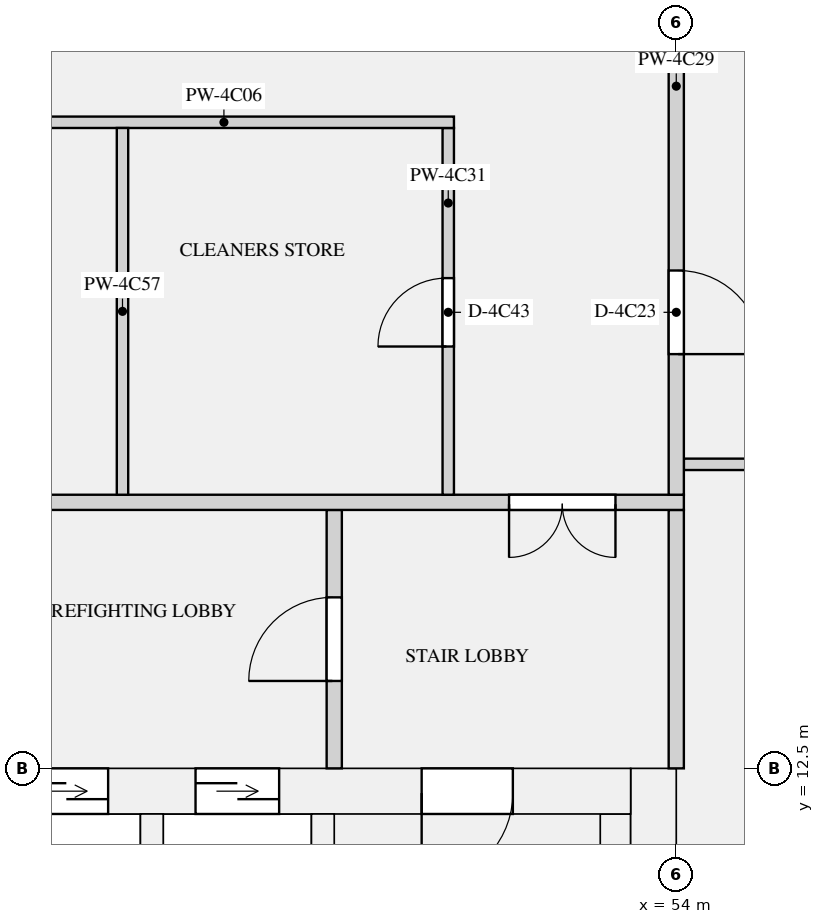
"""IFC4 building model, lengths in metres.
Left out: names, types, materials, properties, quantities, classifications, styles, units other than length and angle.
Written with IfcOpenShell. Run it as: python <this file> out.ifc"""

import sys

from ifc_helpers import new_model, si_unit, direction, frame, frame_2d, origin, place, context, subcontext, project, spatial, rectangle, extrude, element, fill, save


model = new_model("IFC4")
c1 = context("Model", 3, precision=1e-05, world=origin(), true_north=direction((0.0, 1.0)))
c2 = subcontext(c1, "Body", "Model", "MODEL_VIEW")
j1 = project(units=[si_unit("LENGTHUNIT", "METRE"), si_unit("PLANEANGLEUNIT", "RADIAN")], contexts=[c1])
p1 = place(None, origin())
s1 = spatial("IfcSite", under=j1, at=p1, CompositionType="ELEMENT")
p2 = place(p1, origin())
s2 = spatial("IfcBuilding", under=s1, at=p2, CompositionType="ELEMENT")
p3 = place(p2, frame((0.0, 0.0, 216.9)))
s3 = spatial("IfcBuildingStorey", under=s2, at=p3, CompositionType="ELEMENT", Elevation=216.9)
p4 = place(p3, frame((53.7, 0.0, 0.0), z_axis=(0.0, 0.0, 1.0), x_axis=(0.0, 1.0, 0.0)))
e1 = element("IfcWall", 1, at=p4, inside=s3, PredefinedType="SHEAR", context=c2, shape_type="SweptSolid", body=[
    extrude(rectangle(XDim=12.5, YDim=0.6, at=frame_2d((6.25, 0.0))), origin(), (0.0, 0.0, 1.0), 3.15),
])
p5 = place(p3, frame((18.6, 12.2, 0.0), z_axis=(0.0, 0.0, 1.0), x_axis=(1.0, 0.0, 0.0)))
e2 = element("IfcWall", 2, at=p5, inside=s3, PredefinedType="SHEAR", context=c2, shape_type="SweptSolid", body=[
    extrude(rectangle(XDim=34.8, YDim=0.6, at=frame_2d((17.4, 0.0))), origin(), (0.0, 0.0, 1.0), 3.15),
])
p6 = place(p5, frame((24.575, 0.0, 0.0)))
e3 = element("IfcOpeningElement", 3, at=p6, cuts=e2, PredefinedType="OPENING", context=c2, shape_type="SweptSolid", body=[
    extrude(rectangle(XDim=1.1, YDim=2.1, at=frame_2d((0.55, 1.05))), frame((0.0, 0.31, 0.0), z_axis=(0.0, -1.0, 0.0), x_axis=(1.0, 0.0, 0.0)), (0.0, 0.0, 1.0), 0.62),
])
p7 = place(p5, frame((26.825, 0.0, 0.0)))
e4 = element("IfcOpeningElement", 4, at=p7, cuts=e2, PredefinedType="OPENING", context=c2, shape_type="SweptSolid", body=[
    extrude(rectangle(XDim=1.1, YDim=2.1, at=frame_2d((0.55, 1.05))), frame((0.0, 0.31, 0.0), z_axis=(0.0, -1.0, 0.0), x_axis=(1.0, 0.0, 0.0)), (0.0, 0.0, 1.0), 0.62),
])
p8 = place(p5, frame((29.075, 0.0, 0.0)))
e5 = element("IfcOpeningElement", 5, at=p8, cuts=e2, PredefinedType="OPENING", context=c2, shape_type="SweptSolid", body=[
    extrude(rectangle(XDim=1.1, YDim=2.1, at=frame_2d((0.55, 1.05))), frame((0.0, 0.31, 0.0), z_axis=(0.0, -1.0, 0.0), x_axis=(1.0, 0.0, 0.0)), (0.0, 0.0, 1.0), 0.62),
])
p9 = place(p5, frame((8.95, 0.0, 0.0)))
e6 = element("IfcOpeningElement", 6, at=p9, cuts=e2, PredefinedType="OPENING", context=c2, shape_type="SweptSolid", body=[
    extrude(rectangle(XDim=0.9, YDim=2.1, at=frame_2d((0.45, 1.05))), frame((0.0, 0.31, 0.0), z_axis=(0.0, -1.0, 0.0), x_axis=(1.0, 0.0, 0.0)), (0.0, 0.0, 1.0), 0.62),
])
p10 = place(p5, frame((1.55, 0.0, 0.0)))
e7 = element("IfcOpeningElement", 7, at=p10, cuts=e2, PredefinedType="OPENING", context=c2, shape_type="SweptSolid", body=[
    extrude(rectangle(XDim=1.2, YDim=2.1, at=frame_2d((0.6, 1.05))), frame((0.0, 0.31, 0.0), z_axis=(0.0, -1.0, 0.0), x_axis=(1.0, 0.0, 0.0)), (0.0, 0.0, 1.0), 0.62),
])
p11 = place(p5, frame((32.05, 0.0, 0.0)))
e8 = element("IfcOpeningElement", 8, at=p11, cuts=e2, PredefinedType="OPENING", context=c2, shape_type="SweptSolid", body=[
    extrude(rectangle(XDim=1.2, YDim=2.1, at=frame_2d((0.6, 1.05))), frame((0.0, 0.31, 0.0), z_axis=(0.0, -1.0, 0.0), x_axis=(1.0, 0.0, 0.0)), (0.0, 0.0, 1.0), 0.62),
])
p12 = place(p3, frame((53.2, 1.0, 0.0), z_axis=(0.0, 0.0, 1.0), x_axis=(0.0, 1.0, 0.0)))
e9 = element("IfcWall", 9, at=p12, inside=s3, PredefinedType="SHEAR", context=c2, shape_type="SweptSolid", body=[
    extrude(rectangle(XDim=10.9, YDim=0.4, at=frame_2d((5.45, 0.0))), origin(), (0.0, 0.0, 1.0), 3.15),
])
for number, where, z_axis, x_axis in (
    (10, (47.1, 8.25, 0.0), (0.0, 0.0, 1.0), (0.0, 1.0, 0.0)),
    (11, (49.35, 8.25, 0.0), (0.0, 0.0, 1.0), (0.0, 1.0, 0.0)),
):
    element("IfcWall", number, at=place(p3, frame(where, z_axis=z_axis, x_axis=x_axis)), inside=s3, PredefinedType="SHEAR", context=c2, shape_type="SweptSolid", body=[
        extrude(rectangle(XDim=3.65, YDim=0.3, at=frame_2d((1.825, 0.0))), origin(), (0.0, 0.0, 1.0), 3.15),
    ])
p13 = place(p3, frame((49.5, 12.5, 0.0), z_axis=(0.0, 0.0, 1.0), x_axis=(0.0, 1.0, 0.0)))
e12 = element("IfcWall", 12, at=p13, inside=s3, PredefinedType="PARTITIONING", context=c2, shape_type="SweptSolid", body=[
    extrude(rectangle(XDim=3.4, YDim=0.2, at=frame_2d((1.7, 0.0))), origin(), (0.0, 0.0, 1.0), 2.83),
])
p14 = place(p13, frame((1.15, 0.0, 0.0)))
e13 = element("IfcOpeningElement", 13, at=p14, cuts=e12, PredefinedType="OPENING", context=c2, shape_type="SweptSolid", body=[
    extrude(rectangle(XDim=1.1, YDim=2.1, at=frame_2d((0.55, 1.05))), frame((0.0, 0.11, 0.0), z_axis=(0.0, -1.0, 0.0), x_axis=(1.0, 0.0, 0.0)), (0.0, 0.0, 1.0), 0.22),
])
p15 = place(p3, frame((54.0, 12.5, 0.0), z_axis=(0.0, 0.0, 1.0), x_axis=(0.0, 1.0, 0.0)))
e14 = element("IfcWall", 14, at=p15, inside=s3, PredefinedType="PARTITIONING", context=c2, shape_type="SweptSolid", body=[
    extrude(rectangle(XDim=3.4, YDim=0.2, at=frame_2d((1.7, 0.0))), origin(), (0.0, 0.0, 1.0), 2.83),
])
p16 = place(p3, frame((20.925, 21.0, 0.0), z_axis=(0.0, 0.0, 1.0), x_axis=(1.0, 0.0, 0.0)))
e15 = element("IfcWall", 15, at=p16, inside=s3, PredefinedType="PARTITIONING", context=c2, shape_type="SweptSolid", body=[
    extrude(rectangle(XDim=30.15, YDim=0.15, at=frame_2d((15.075, 0.0))), origin(), (0.0, 0.0, 1.0), 2.83),
])
p17 = place(p16, frame((6.053, 0.0, 0.0)))
e16 = element("IfcOpeningElement", 16, at=p17, cuts=e15, PredefinedType="OPENING", context=c2, shape_type="SweptSolid", body=[
    extrude(rectangle(XDim=0.9, YDim=2.1, at=frame_2d((0.45, 1.05))), frame((0.0, 0.085, 0.0), z_axis=(0.0, -1.0, 0.0), x_axis=(1.0, 0.0, 0.0)), (0.0, 0.0, 1.0), 0.17),
])
p18 = place(p16, frame((10.339, 0.0, 0.0)))
e17 = element("IfcOpeningElement", 17, at=p18, cuts=e15, PredefinedType="OPENING", context=c2, shape_type="SweptSolid", body=[
    extrude(rectangle(XDim=0.9, YDim=2.1, at=frame_2d((0.45, 1.05))), frame((0.0, 0.085, 0.0), z_axis=(0.0, -1.0, 0.0), x_axis=(1.0, 0.0, 0.0)), (0.0, 0.0, 1.0), 0.17),
])
p19 = place(p16, frame((14.625, 0.0, 0.0)))
e18 = element("IfcOpeningElement", 18, at=p19, cuts=e15, PredefinedType="OPENING", context=c2, shape_type="SweptSolid", body=[
    extrude(rectangle(XDim=0.9, YDim=2.1, at=frame_2d((0.45, 1.05))), frame((0.0, 0.085, 0.0), z_axis=(0.0, -1.0, 0.0), x_axis=(1.0, 0.0, 0.0)), (0.0, 0.0, 1.0), 0.17),
])
p20 = place(p16, frame((18.911, 0.0, 0.0)))
e19 = element("IfcOpeningElement", 19, at=p20, cuts=e15, PredefinedType="OPENING", context=c2, shape_type="SweptSolid", body=[
    extrude(rectangle(XDim=0.9, YDim=2.1, at=frame_2d((0.45, 1.05))), frame((0.0, 0.085, 0.0), z_axis=(0.0, -1.0, 0.0), x_axis=(1.0, 0.0, 0.0)), (0.0, 0.0, 1.0), 0.17),
])
p21 = place(p16, frame((23.197, 0.0, 0.0)))
e20 = element("IfcOpeningElement", 20, at=p21, cuts=e15, PredefinedType="OPENING", context=c2, shape_type="SweptSolid", body=[
    extrude(rectangle(XDim=0.9, YDim=2.1, at=frame_2d((0.45, 1.05))), frame((0.0, 0.085, 0.0), z_axis=(0.0, -1.0, 0.0), x_axis=(1.0, 0.0, 0.0)), (0.0, 0.0, 1.0), 0.17),
])
p22 = place(p3, frame((54.1, 16.5, 0.0), z_axis=(0.0, 0.0, 1.0), x_axis=(1.0, 0.0, 0.0)))
e21 = element("IfcWall", 21, at=p22, inside=s3, PredefinedType="PARTITIONING", context=c2, shape_type="SweptSolid", body=[
    extrude(rectangle(XDim=14.75, YDim=0.15, at=frame_2d((7.375, 0.0))), origin(), (0.0, 0.0, 1.0), 2.83),
])
p23 = place(p22, frame((1.4, 0.0, 0.0)))
e22 = element("IfcOpeningElement", 22, at=p23, cuts=e21, PredefinedType="OPENING", context=c2, shape_type="SweptSolid", body=[
    extrude(rectangle(XDim=1.5, YDim=2.1, at=frame_2d((0.75, 1.05))), frame((0.0, 0.085, 0.0), z_axis=(0.0, -1.0, 0.0), x_axis=(1.0, 0.0, 0.0)), (0.0, 0.0, 1.0), 0.17),
])
p24 = place(p3, frame((17.925, 16.0, 0.0), z_axis=(0.0, 0.0, 1.0), x_axis=(1.0, 0.0, 0.0)))
e23 = element("IfcWall", 23, at=p24, inside=s3, PredefinedType="PARTITIONING", context=c2, shape_type="SweptSolid", body=[
    extrude(rectangle(XDim=36.175, YDim=0.2, at=frame_2d((18.087, 0.0))), origin(), (0.0, 0.0, 1.0), 2.83),
])
p25 = place(p24, frame((0.875, 0.0, 0.0)))
e24 = element("IfcOpeningElement", 24, at=p25, cuts=e23, PredefinedType="OPENING", context=c2, shape_type="SweptSolid", body=[
    extrude(rectangle(XDim=1.4, YDim=2.1, at=frame_2d((0.7, 1.05))), frame((0.0, 0.11, 0.0), z_axis=(0.0, -1.0, 0.0), x_axis=(1.0, 0.0, 0.0)), (0.0, 0.0, 1.0), 0.22),
])
p26 = place(p24, frame((33.875, 0.0, 0.0)))
e25 = element("IfcOpeningElement", 25, at=p26, cuts=e23, PredefinedType="OPENING", context=c2, shape_type="SweptSolid", body=[
    extrude(rectangle(XDim=1.4, YDim=2.1, at=frame_2d((0.7, 1.05))), frame((0.0, 0.11, 0.0), z_axis=(0.0, -1.0, 0.0), x_axis=(1.0, 0.0, 0.0)), (0.0, 0.0, 1.0), 0.22),
])
p27 = place(p3, frame((54.0, 16.1, 0.0), z_axis=(0.0, 0.0, 1.0), x_axis=(0.0, 1.0, 0.0)))
e26 = element("IfcWall", 26, at=p27, inside=s3, PredefinedType="PARTITIONING", context=c2, shape_type="SweptSolid", body=[
    extrude(rectangle(XDim=7.8, YDim=0.2, at=frame_2d((3.9, 0.0))), origin(), (0.0, 0.0, 1.0), 2.83),
])
p28 = place(p27, frame((1.85, 0.0, 0.0)))
e27 = element("IfcOpeningElement", 27, at=p28, cuts=e26, PredefinedType="OPENING", context=c2, shape_type="SweptSolid", body=[
    extrude(rectangle(XDim=1.1, YDim=2.1, at=frame_2d((0.55, 1.05))), frame((0.0, 0.11, 0.0), z_axis=(0.0, -1.0, 0.0), x_axis=(1.0, 0.0, 0.0)), (0.0, 0.0, 1.0), 0.22),
])
p29 = place(p3, frame((51.0, 16.1, 0.0), z_axis=(0.0, 0.0, 1.0), x_axis=(0.0, 1.0, 0.0)))
e28 = element("IfcWall", 28, at=p29, inside=s3, PredefinedType="PARTITIONING", context=c2, shape_type="SweptSolid", body=[
    extrude(rectangle(XDim=4.825, YDim=0.15, at=frame_2d((2.413, 0.0))), origin(), (0.0, 0.0, 1.0), 2.83),
])
p30 = place(p29, frame((1.95, 0.0, 0.0)))
e29 = element("IfcOpeningElement", 29, at=p30, cuts=e28, PredefinedType="OPENING", context=c2, shape_type="SweptSolid", body=[
    extrude(rectangle(XDim=0.9, YDim=2.1, at=frame_2d((0.45, 1.05))), frame((0.0, 0.085, 0.0), z_axis=(0.0, -1.0, 0.0), x_axis=(1.0, 0.0, 0.0)), (0.0, 0.0, 1.0), 0.17),
])
p31 = place(p3, frame((46.714, 16.1, 0.0), z_axis=(0.0, 0.0, 1.0), x_axis=(0.0, 1.0, 0.0)))
e30 = element("IfcWall", 30, at=p31, inside=s3, PredefinedType="PARTITIONING", context=c2, shape_type="SweptSolid", body=[
    extrude(rectangle(XDim=4.825, YDim=0.15, at=frame_2d((2.413, 0.0))), origin(), (0.0, 0.0, 1.0), 2.83),
])
p32 = place(p7, origin())
e31 = element("IfcDoor", 31, at=p32, inside=s3, OperationType="DOUBLE_DOOR_SLIDING", PredefinedType="DOOR", context=c2, shape_type="SweptSolid", body=[
    extrude(rectangle(XDim=1.1, YDim=2.1, at=frame_2d((0.55, 1.05))), frame((0.0, 0.025, 0.0), z_axis=(0.0, -1.0, 0.0), x_axis=(1.0, 0.0, 0.0)), (0.0, 0.0, 1.0), 0.05),
])
fill(e4, e31)
p33 = place(p8, origin())
e32 = element("IfcDoor", 32, at=p33, inside=s3, OperationType="DOUBLE_DOOR_SLIDING", PredefinedType="DOOR", context=c2, shape_type="SweptSolid", body=[
    extrude(rectangle(XDim=1.1, YDim=2.1, at=frame_2d((0.55, 1.05))), frame((0.0, 0.025, 0.0), z_axis=(0.0, -1.0, 0.0), x_axis=(1.0, 0.0, 0.0)), (0.0, 0.0, 1.0), 0.05),
])
fill(e5, e32)
p34 = place(p11, frame((1.2, 0.0, 0.0), z_axis=(0.0, 0.0, 1.0), x_axis=(-1.0, 0.0, 0.0)))
e33 = element("IfcDoor", 33, at=p34, inside=s3, OperationType="SINGLE_SWING_RIGHT", PredefinedType="DOOR", context=c2, shape_type="SweptSolid", body=[
    extrude(rectangle(XDim=1.2, YDim=2.1, at=frame_2d((0.6, 1.05))), frame((0.0, 0.025, 0.0), z_axis=(0.0, -1.0, 0.0), x_axis=(1.0, 0.0, 0.0)), (0.0, 0.0, 1.0), 0.05),
])
fill(e8, e33)
p35 = place(p14, origin())
e34 = element("IfcDoor", 34, at=p35, inside=s3, OperationType="SINGLE_SWING_LEFT", PredefinedType="DOOR", context=c2, shape_type="SweptSolid", body=[
    extrude(rectangle(XDim=1.1, YDim=2.1, at=frame_2d((0.55, 1.05))), frame((0.0, 0.025, 0.0), z_axis=(0.0, -1.0, 0.0), x_axis=(1.0, 0.0, 0.0)), (0.0, 0.0, 1.0), 0.05),
])
fill(e13, e34)
p36 = place(p26, frame((1.4, 0.0, 0.0), z_axis=(0.0, 0.0, 1.0), x_axis=(-1.0, 0.0, 0.0)))
e35 = element("IfcDoor", 35, at=p36, inside=s3, OperationType="DOUBLE_DOOR_SINGLE_SWING", PredefinedType="DOOR", context=c2, shape_type="SweptSolid", body=[
    extrude(rectangle(XDim=1.4, YDim=2.1, at=frame_2d((0.7, 1.05))), frame((0.0, 0.025, 0.0), z_axis=(0.0, -1.0, 0.0), x_axis=(1.0, 0.0, 0.0)), (0.0, 0.0, 1.0), 0.05),
])
fill(e25, e35)
p37 = place(p28, frame((1.1, 0.0, 0.0), z_axis=(0.0, 0.0, 1.0), x_axis=(-1.0, 0.0, 0.0)))
e36 = element("IfcDoor", 36, at=p37, inside=s3, OperationType="SINGLE_SWING_RIGHT", PredefinedType="DOOR", context=c2, shape_type="SweptSolid", body=[
    extrude(rectangle(XDim=1.1, YDim=2.1, at=frame_2d((0.55, 1.05))), frame((0.0, 0.025, 0.0), z_axis=(0.0, -1.0, 0.0), x_axis=(1.0, 0.0, 0.0)), (0.0, 0.0, 1.0), 0.05),
])
fill(e27, e36)
p38 = place(p30, origin())
e37 = element("IfcDoor", 37, at=p38, inside=s3, OperationType="SINGLE_SWING_LEFT", PredefinedType="DOOR", context=c2, shape_type="SweptSolid", body=[
    extrude(rectangle(XDim=0.9, YDim=2.1, at=frame_2d((0.45, 1.05))), frame((0.0, 0.025, 0.0), z_axis=(0.0, -1.0, 0.0), x_axis=(1.0, 0.0, 0.0)), (0.0, 0.0, 1.0), 0.05),
])
fill(e29, e37)
save(model, sys.argv[1])
